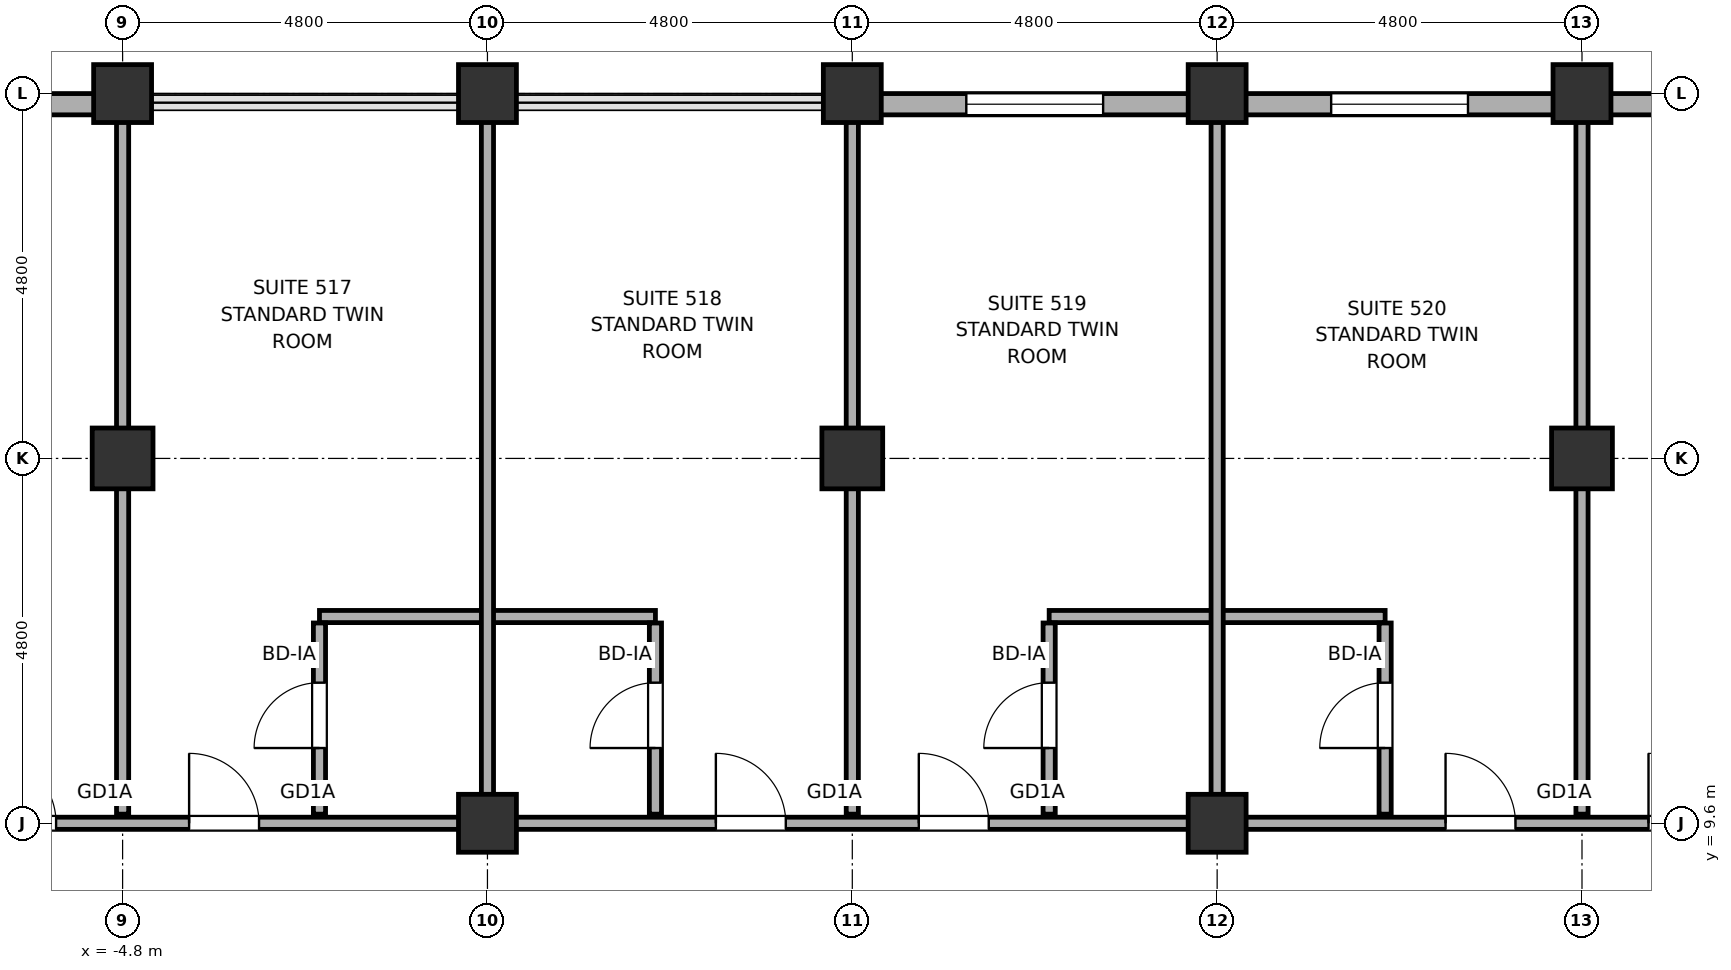
"""IFC4 building model, lengths in metres.
Left out: names, types, materials, properties, quantities, classifications, styles, units other than length and angle.
Written with IfcOpenShell. Run it as: python <this file> out.ifc"""

import sys

from ifc_helpers import new_model, si_unit, direction, frame, frame_2d, origin, origin_2d, place, context, subcontext, project, spatial, rectangle, hollow_rectangle, hollow_circle, extrude, element, fill, save


model = new_model("IFC4")
c1 = context("Model", 3, precision=1e-05, world=origin(), true_north=direction((0.0, 1.0)))
c2 = subcontext(c1, "Body", "Model", "MODEL_VIEW")
j1 = project(units=[si_unit("LENGTHUNIT", "METRE"), si_unit("PLANEANGLEUNIT", "RADIAN")], contexts=[c1])
p1 = place(None, origin())
s1 = spatial("IfcSite", under=j1, at=p1, CompositionType="ELEMENT")
p2 = place(p1, origin())
s2 = spatial("IfcBuilding", under=s1, at=p2, CompositionType="ELEMENT")
p3 = place(p2, frame((0.0, 0.0, 30.0)))
s3 = spatial("IfcBuildingStorey", under=s2, at=p3, CompositionType="ELEMENT", Elevation=30.0)
p4 = place(p3, frame((-4.8, 14.4, 0.0), z_axis=(0.0, 0.0, 1.0), x_axis=(1.0, 0.0, 0.0)))
e1 = element("IfcColumn", 1, at=p4, inside=s3, PredefinedType="COLUMN", context=c2, shape_type="SweptSolid", body=[
    extrude(hollow_rectangle(XDim=0.8, YDim=0.8, WallThickness=0.036, at=origin_2d()), origin(), (0.0, 0.0, 1.0), 3.7),
])
for number, where, z_axis, x_axis in (
    (2, (-4.8, 19.2, 0.0), (0.0, 0.0, 1.0), (1.0, 0.0, 0.0)),
    (3, (0.0, 9.6, 0.0), (0.0, 0.0, 1.0), (1.0, 0.0, 0.0)),
    (4, (0.0, 19.2, 0.0), (0.0, 0.0, 1.0), (1.0, 0.0, 0.0)),
):
    element("IfcColumn", number, at=place(p3, frame(where, z_axis=z_axis, x_axis=x_axis)), inside=s3, PredefinedType="COLUMN", context=c2, shape_type="SweptSolid", body=[
        extrude(hollow_circle(Radius=0.381, WallThickness=0.032, at=origin_2d()), origin(), (0.0, 0.0, 1.0), 3.7),
    ])
p5 = place(p3, frame((4.8, 14.4, 0.0), z_axis=(0.0, 0.0, 1.0), x_axis=(1.0, 0.0, 0.0)))
e5 = element("IfcColumn", 5, at=p5, inside=s3, PredefinedType="COLUMN", context=c2, shape_type="SweptSolid", body=[
    extrude(hollow_rectangle(XDim=0.8, YDim=0.8, WallThickness=0.036, at=origin_2d()), origin(), (0.0, 0.0, 1.0), 3.7),
])
for number, where, z_axis, x_axis in (
    (6, (4.8, 19.2, 0.0), (0.0, 0.0, 1.0), (1.0, 0.0, 0.0)),
    (7, (9.6, 9.6, 0.0), (0.0, 0.0, 1.0), (1.0, 0.0, 0.0)),
    (8, (9.6, 19.2, 0.0), (0.0, 0.0, 1.0), (1.0, 0.0, 0.0)),
):
    element("IfcColumn", number, at=place(p3, frame(where, z_axis=z_axis, x_axis=x_axis)), inside=s3, PredefinedType="COLUMN", context=c2, shape_type="SweptSolid", body=[
        extrude(hollow_circle(Radius=0.381, WallThickness=0.032, at=origin_2d()), origin(), (0.0, 0.0, 1.0), 3.7),
    ])
p6 = place(p3, frame((14.4, 14.4, 0.0), z_axis=(0.0, 0.0, 1.0), x_axis=(1.0, 0.0, 0.0)))
e9 = element("IfcColumn", 9, at=p6, inside=s3, PredefinedType="COLUMN", context=c2, shape_type="SweptSolid", body=[
    extrude(hollow_rectangle(XDim=0.8, YDim=0.8, WallThickness=0.036, at=origin_2d()), origin(), (0.0, 0.0, 1.0), 3.7),
])
p7 = place(p3, frame((14.4, 19.2, 0.0), z_axis=(0.0, 0.0, 1.0), x_axis=(1.0, 0.0, 0.0)))
e10 = element("IfcColumn", 10, at=p7, inside=s3, PredefinedType="COLUMN", context=c2, shape_type="SweptSolid", body=[
    extrude(hollow_circle(Radius=0.381, WallThickness=0.032, at=origin_2d()), origin(), (0.0, 0.0, 1.0), 3.7),
])
p8 = place(p3, frame((-30.0, 19.06, 0.0), z_axis=(0.0, 0.0, 1.0), x_axis=(1.0, 0.0, 0.0)))
e11 = element("IfcWall", 11, at=p8, inside=s3, PredefinedType="SOLIDWALL", context=c2, shape_type="SweptSolid", body=[
    extrude(rectangle(XDim=25.25, YDim=0.28, at=frame_2d((12.625, 0.0))), origin(), (0.0, 0.0, 1.0), 2.12),
])
p9 = place(p8, frame((17.1, 0.0, 0.0)))
e12 = element("IfcOpeningElement", 12, at=p9, cuts=e11, PredefinedType="OPENING", context=c2, shape_type="SweptSolid", body=[
    extrude(rectangle(XDim=1.8, YDim=2.02, at=frame_2d((0.9, 1.01))), frame((0.0, 0.155, 0.0), z_axis=(0.0, -1.0, 0.0), x_axis=(1.0, 0.0, 0.0)), (0.0, 0.0, 1.0), 0.31),
])
p10 = place(p8, frame((9.0, 0.0, 0.75)))
e13 = element("IfcOpeningElement", 13, at=p10, cuts=e11, PredefinedType="OPENING", context=c2, shape_type="SweptSolid", body=[
    extrude(rectangle(XDim=1.2, YDim=1.15, at=frame_2d((0.6, 0.575))), frame((0.0, 0.155, 0.0), z_axis=(0.0, -1.0, 0.0), x_axis=(1.0, 0.0, 0.0)), (0.0, 0.0, 1.0), 0.31),
])
p11 = place(p8, frame((12.3, 0.0, 0.75)))
e14 = element("IfcOpeningElement", 14, at=p11, cuts=e11, PredefinedType="OPENING", context=c2, shape_type="SweptSolid", body=[
    extrude(rectangle(XDim=1.8, YDim=1.15, at=frame_2d((0.9, 0.575))), frame((0.0, 0.155, 0.0), z_axis=(0.0, -1.0, 0.0), x_axis=(1.0, 0.0, 0.0)), (0.0, 0.0, 1.0), 0.31),
])
p12 = place(p8, frame((21.9, 0.0, 0.75)))
e15 = element("IfcOpeningElement", 15, at=p12, cuts=e11, PredefinedType="OPENING", context=c2, shape_type="SweptSolid", body=[
    extrude(rectangle(XDim=1.8, YDim=1.15, at=frame_2d((0.9, 0.575))), frame((0.0, 0.155, 0.0), z_axis=(0.0, -1.0, 0.0), x_axis=(1.0, 0.0, 0.0)), (0.0, 0.0, 1.0), 0.31),
])
p13 = place(p3, frame((4.75, 19.06, 0.0), z_axis=(0.0, 0.0, 1.0), x_axis=(1.0, 0.0, 0.0)))
e16 = element("IfcWall", 16, at=p13, inside=s3, PredefinedType="SOLIDWALL", context=c2, shape_type="SweptSolid", body=[
    extrude(rectangle(XDim=20.45, YDim=0.28, at=frame_2d((10.225, 0.0))), origin(), (0.0, 0.0, 1.0), 2.12),
])
p14 = place(p13, frame((1.55, 0.0, 0.75)))
e17 = element("IfcOpeningElement", 17, at=p14, cuts=e16, PredefinedType="OPENING", context=c2, shape_type="SweptSolid", body=[
    extrude(rectangle(XDim=1.8, YDim=1.15, at=frame_2d((0.9, 0.575))), frame((0.0, 0.155, 0.0), z_axis=(0.0, -1.0, 0.0), x_axis=(1.0, 0.0, 0.0)), (0.0, 0.0, 1.0), 0.31),
])
p15 = place(p13, frame((6.35, 0.0, 0.75)))
e18 = element("IfcOpeningElement", 18, at=p15, cuts=e16, PredefinedType="OPENING", context=c2, shape_type="SweptSolid", body=[
    extrude(rectangle(XDim=1.8, YDim=1.15, at=frame_2d((0.9, 0.575))), frame((0.0, 0.155, 0.0), z_axis=(0.0, -1.0, 0.0), x_axis=(1.0, 0.0, 0.0)), (0.0, 0.0, 1.0), 0.31),
])
p16 = place(p13, frame((11.15, 0.0, 0.75)))
e19 = element("IfcOpeningElement", 19, at=p16, cuts=e16, PredefinedType="OPENING", context=c2, shape_type="SweptSolid", body=[
    extrude(rectangle(XDim=1.8, YDim=1.15, at=frame_2d((0.9, 0.575))), frame((0.0, 0.155, 0.0), z_axis=(0.0, -1.0, 0.0), x_axis=(1.0, 0.0, 0.0)), (0.0, 0.0, 1.0), 0.31),
])
p17 = place(p3, frame((-33.43, 9.6, 0.0), z_axis=(0.0, 0.0, 1.0), x_axis=(1.0, 0.0, 0.0)))
e20 = element("IfcWall", 20, at=p17, inside=s3, PredefinedType="PARTITIONING", context=c2, shape_type="SweptSolid", body=[
    extrude(rectangle(XDim=62.06, YDim=0.16, at=frame_2d((31.03, 0.0))), origin(), (0.0, 0.0, 1.0), 2.12),
])
p18 = place(p17, frame((6.8, 0.0, 0.0)))
e21 = element("IfcOpeningElement", 21, at=p18, cuts=e20, PredefinedType="OPENING", context=c2, shape_type="SweptSolid", body=[
    extrude(rectangle(XDim=0.9, YDim=2.02, at=frame_2d((0.45, 1.01))), frame((0.0, 0.095, 0.0), z_axis=(0.0, -1.0, 0.0), x_axis=(1.0, 0.0, 0.0)), (0.0, 0.0, 1.0), 0.19),
])
p19 = place(p17, frame((54.361, 0.0, 0.0)))
e22 = element("IfcOpeningElement", 22, at=p19, cuts=e20, PredefinedType="OPENING", context=c2, shape_type="SweptSolid", body=[
    extrude(rectangle(XDim=0.9, YDim=2.02, at=frame_2d((0.45, 1.01))), frame((0.0, 0.095, 0.0), z_axis=(0.0, -1.0, 0.0), x_axis=(1.0, 0.0, 0.0)), (0.0, 0.0, 1.0), 0.19),
])
p20 = place(p17, frame((10.69, 0.0, 0.0)))
e23 = element("IfcOpeningElement", 23, at=p20, cuts=e20, PredefinedType="OPENING", context=c2, shape_type="SweptSolid", body=[
    extrude(rectangle(XDim=0.9, YDim=2.02, at=frame_2d((0.45, 1.01))), frame((0.0, 0.095, 0.0), z_axis=(0.0, -1.0, 0.0), x_axis=(1.0, 0.0, 0.0)), (0.0, 0.0, 1.0), 0.19),
])
p21 = place(p17, frame((12.07, 0.0, 0.0)))
e24 = element("IfcOpeningElement", 24, at=p21, cuts=e20, PredefinedType="OPENING", context=c2, shape_type="SweptSolid", body=[
    extrude(rectangle(XDim=0.9, YDim=2.02, at=frame_2d((0.45, 1.01))), frame((0.0, 0.095, 0.0), z_axis=(0.0, -1.0, 0.0), x_axis=(1.0, 0.0, 0.0)), (0.0, 0.0, 1.0), 0.19),
])
p22 = place(p17, frame((17.235, 0.0, 0.0)))
e25 = element("IfcOpeningElement", 25, at=p22, cuts=e20, PredefinedType="OPENING", context=c2, shape_type="SweptSolid", body=[
    extrude(rectangle(XDim=0.92, YDim=2.02, at=frame_2d((0.46, 1.01))), frame((0.0, 0.095, 0.0), z_axis=(0.0, -1.0, 0.0), x_axis=(1.0, 0.0, 0.0)), (0.0, 0.0, 1.0), 0.19),
])
p23 = place(p17, frame((19.905, 0.0, 0.0)))
e26 = element("IfcOpeningElement", 26, at=p23, cuts=e20, PredefinedType="OPENING", context=c2, shape_type="SweptSolid", body=[
    extrude(rectangle(XDim=0.92, YDim=2.02, at=frame_2d((0.46, 1.01))), frame((0.0, 0.095, 0.0), z_axis=(0.0, -1.0, 0.0), x_axis=(1.0, 0.0, 0.0)), (0.0, 0.0, 1.0), 0.19),
])
p24 = place(p17, frame((26.835, 0.0, 0.0)))
e27 = element("IfcOpeningElement", 27, at=p24, cuts=e20, PredefinedType="OPENING", context=c2, shape_type="SweptSolid", body=[
    extrude(rectangle(XDim=0.92, YDim=2.02, at=frame_2d((0.46, 1.01))), frame((0.0, 0.095, 0.0), z_axis=(0.0, -1.0, 0.0), x_axis=(1.0, 0.0, 0.0)), (0.0, 0.0, 1.0), 0.19),
])
p25 = place(p17, frame((29.505, 0.0, 0.0)))
e28 = element("IfcOpeningElement", 28, at=p25, cuts=e20, PredefinedType="OPENING", context=c2, shape_type="SweptSolid", body=[
    extrude(rectangle(XDim=0.92, YDim=2.02, at=frame_2d((0.46, 1.01))), frame((0.0, 0.095, 0.0), z_axis=(0.0, -1.0, 0.0), x_axis=(1.0, 0.0, 0.0)), (0.0, 0.0, 1.0), 0.19),
])
p26 = place(p17, frame((36.435, 0.0, 0.0)))
e29 = element("IfcOpeningElement", 29, at=p26, cuts=e20, PredefinedType="OPENING", context=c2, shape_type="SweptSolid", body=[
    extrude(rectangle(XDim=0.92, YDim=2.02, at=frame_2d((0.46, 1.01))), frame((0.0, 0.095, 0.0), z_axis=(0.0, -1.0, 0.0), x_axis=(1.0, 0.0, 0.0)), (0.0, 0.0, 1.0), 0.19),
])
p27 = place(p17, frame((39.105, 0.0, 0.0)))
e30 = element("IfcOpeningElement", 30, at=p27, cuts=e20, PredefinedType="OPENING", context=c2, shape_type="SweptSolid", body=[
    extrude(rectangle(XDim=0.92, YDim=2.02, at=frame_2d((0.46, 1.01))), frame((0.0, 0.095, 0.0), z_axis=(0.0, -1.0, 0.0), x_axis=(1.0, 0.0, 0.0)), (0.0, 0.0, 1.0), 0.19),
])
p28 = place(p17, frame((46.035, 0.0, 0.0)))
e31 = element("IfcOpeningElement", 31, at=p28, cuts=e20, PredefinedType="OPENING", context=c2, shape_type="SweptSolid", body=[
    extrude(rectangle(XDim=0.92, YDim=2.02, at=frame_2d((0.46, 1.01))), frame((0.0, 0.095, 0.0), z_axis=(0.0, -1.0, 0.0), x_axis=(1.0, 0.0, 0.0)), (0.0, 0.0, 1.0), 0.19),
])
p29 = place(p17, frame((48.705, 0.0, 0.0)))
e32 = element("IfcOpeningElement", 32, at=p29, cuts=e20, PredefinedType="OPENING", context=c2, shape_type="SweptSolid", body=[
    extrude(rectangle(XDim=0.92, YDim=2.02, at=frame_2d((0.46, 1.01))), frame((0.0, 0.095, 0.0), z_axis=(0.0, -1.0, 0.0), x_axis=(1.0, 0.0, 0.0)), (0.0, 0.0, 1.0), 0.19),
])
p30 = place(p3, frame((-2.21, 12.32, 0.0), z_axis=(0.0, 0.0, 1.0), x_axis=(1.0, 0.0, 0.0)))
e33 = element("IfcWall", 33, at=p30, inside=s3, PredefinedType="PARTITIONING", context=c2, shape_type="SweptSolid", body=[
    extrude(rectangle(XDim=4.42, YDim=0.16, at=frame_2d((2.21, 0.0))), origin(), (0.0, 0.0, 1.0), 3.02),
])
p31 = place(p3, frame((7.39, 12.32, 0.0), z_axis=(0.0, 0.0, 1.0), x_axis=(1.0, 0.0, 0.0)))
e34 = element("IfcWall", 34, at=p31, inside=s3, PredefinedType="PARTITIONING", context=c2, shape_type="SweptSolid", body=[
    extrude(rectangle(XDim=4.42, YDim=0.16, at=frame_2d((2.21, 0.0))), origin(), (0.0, 0.0, 1.0), 3.02),
])
p32 = place(p3, frame((-4.8, 9.72, 0.0), z_axis=(0.0, 0.0, 1.0), x_axis=(0.0, 1.0, 0.0)))
e35 = element("IfcWall", 35, at=p32, inside=s3, PredefinedType="PARTITIONING", context=c2, shape_type="SweptSolid", body=[
    extrude(rectangle(XDim=9.19, YDim=0.16, at=frame_2d((4.595, 0.0))), origin(), (0.0, 0.0, 1.0), 2.12),
])
p33 = place(p3, frame((-2.21, 9.72, 0.0), z_axis=(0.0, 0.0, 1.0), x_axis=(0.0, 1.0, 0.0)))
e36 = element("IfcWall", 36, at=p33, inside=s3, PredefinedType="PARTITIONING", context=c2, shape_type="SweptSolid", body=[
    extrude(rectangle(XDim=2.515, YDim=0.16, at=frame_2d((1.258, 0.0))), origin(), (0.0, 0.0, 1.0), 2.12),
])
p34 = place(p33, frame((0.87, 0.0, 0.0)))
e37 = element("IfcOpeningElement", 37, at=p34, cuts=e36, PredefinedType="OPENING", context=c2, shape_type="SweptSolid", body=[
    extrude(rectangle(XDim=0.86, YDim=2.02, at=frame_2d((0.43, 1.01))), frame((0.0, 0.095, 0.0), z_axis=(0.0, -1.0, 0.0), x_axis=(1.0, 0.0, 0.0)), (0.0, 0.0, 1.0), 0.19),
])
p35 = place(p3, frame((0.0, 9.72, 0.0), z_axis=(0.0, 0.0, 1.0), x_axis=(0.0, 1.0, 0.0)))
e38 = element("IfcWall", 38, at=p35, inside=s3, PredefinedType="PARTITIONING", context=c2, shape_type="SweptSolid", body=[
    extrude(rectangle(XDim=9.275, YDim=0.16, at=frame_2d((4.638, 0.0))), origin(), (0.0, 0.0, 1.0), 2.12),
])
p36 = place(p3, frame((2.21, 9.72, 0.0), z_axis=(0.0, 0.0, 1.0), x_axis=(0.0, 1.0, 0.0)))
e39 = element("IfcWall", 39, at=p36, inside=s3, PredefinedType="PARTITIONING", context=c2, shape_type="SweptSolid", body=[
    extrude(rectangle(XDim=2.515, YDim=0.16, at=frame_2d((1.258, 0.0))), origin(), (0.0, 0.0, 1.0), 2.12),
])
p37 = place(p36, frame((0.87, 0.0, 0.0)))
e40 = element("IfcOpeningElement", 40, at=p37, cuts=e39, PredefinedType="OPENING", context=c2, shape_type="SweptSolid", body=[
    extrude(rectangle(XDim=0.86, YDim=2.02, at=frame_2d((0.43, 1.01))), frame((0.0, 0.095, 0.0), z_axis=(0.0, -1.0, 0.0), x_axis=(1.0, 0.0, 0.0)), (0.0, 0.0, 1.0), 0.19),
])
p38 = place(p3, frame((4.8, 9.72, 0.0), z_axis=(0.0, 0.0, 1.0), x_axis=(0.0, 1.0, 0.0)))
e41 = element("IfcWall", 41, at=p38, inside=s3, PredefinedType="PARTITIONING", context=c2, shape_type="SweptSolid", body=[
    extrude(rectangle(XDim=9.19, YDim=0.16, at=frame_2d((4.595, 0.0))), origin(), (0.0, 0.0, 1.0), 2.12),
])
p39 = place(p3, frame((7.39, 9.72, 0.0), z_axis=(0.0, 0.0, 1.0), x_axis=(0.0, 1.0, 0.0)))
e42 = element("IfcWall", 42, at=p39, inside=s3, PredefinedType="PARTITIONING", context=c2, shape_type="SweptSolid", body=[
    extrude(rectangle(XDim=2.515, YDim=0.16, at=frame_2d((1.258, 0.0))), origin(), (0.0, 0.0, 1.0), 2.12),
])
p40 = place(p39, frame((0.87, 0.0, 0.0)))
e43 = element("IfcOpeningElement", 43, at=p40, cuts=e42, PredefinedType="OPENING", context=c2, shape_type="SweptSolid", body=[
    extrude(rectangle(XDim=0.86, YDim=2.02, at=frame_2d((0.43, 1.01))), frame((0.0, 0.095, 0.0), z_axis=(0.0, -1.0, 0.0), x_axis=(1.0, 0.0, 0.0)), (0.0, 0.0, 1.0), 0.19),
])
p41 = place(p3, frame((9.6, 9.72, 0.0), z_axis=(0.0, 0.0, 1.0), x_axis=(0.0, 1.0, 0.0)))
e44 = element("IfcWall", 44, at=p41, inside=s3, PredefinedType="PARTITIONING", context=c2, shape_type="SweptSolid", body=[
    extrude(rectangle(XDim=9.19, YDim=0.16, at=frame_2d((4.595, 0.0))), origin(), (0.0, 0.0, 1.0), 2.12),
])
p42 = place(p3, frame((11.81, 9.72, 0.0), z_axis=(0.0, 0.0, 1.0), x_axis=(0.0, 1.0, 0.0)))
e45 = element("IfcWall", 45, at=p42, inside=s3, PredefinedType="PARTITIONING", context=c2, shape_type="SweptSolid", body=[
    extrude(rectangle(XDim=2.515, YDim=0.16, at=frame_2d((1.258, 0.0))), origin(), (0.0, 0.0, 1.0), 2.12),
])
p43 = place(p42, frame((0.87, 0.0, 0.0)))
e46 = element("IfcOpeningElement", 46, at=p43, cuts=e45, PredefinedType="OPENING", context=c2, shape_type="SweptSolid", body=[
    extrude(rectangle(XDim=0.86, YDim=2.02, at=frame_2d((0.43, 1.01))), frame((0.0, 0.095, 0.0), z_axis=(0.0, -1.0, 0.0), x_axis=(1.0, 0.0, 0.0)), (0.0, 0.0, 1.0), 0.19),
])
p44 = place(p3, frame((14.4, 9.72, 0.0), z_axis=(0.0, 0.0, 1.0), x_axis=(0.0, 1.0, 0.0)))
e47 = element("IfcWall", 47, at=p44, inside=s3, PredefinedType="PARTITIONING", context=c2, shape_type="SweptSolid", body=[
    extrude(rectangle(XDim=9.19, YDim=0.16, at=frame_2d((4.595, 0.0))), origin(), (0.0, 0.0, 1.0), 2.12),
])
p45 = place(p14, origin())
e48 = element("IfcWindow", 48, at=p45, inside=s3, PartitioningType="SINGLE_PANEL", PredefinedType="WINDOW", context=c2, shape_type="SweptSolid", body=[
    extrude(rectangle(XDim=1.8, YDim=1.15, at=frame_2d((0.9, 0.575))), frame((0.0, 0.03, 0.0), z_axis=(0.0, -1.0, 0.0), x_axis=(1.0, 0.0, 0.0)), (0.0, 0.0, 1.0), 0.06),
])
fill(e17, e48)
p46 = place(p15, origin())
e49 = element("IfcWindow", 49, at=p46, inside=s3, PartitioningType="SINGLE_PANEL", PredefinedType="WINDOW", context=c2, shape_type="SweptSolid", body=[
    extrude(rectangle(XDim=1.8, YDim=1.15, at=frame_2d((0.9, 0.575))), frame((0.0, 0.03, 0.0), z_axis=(0.0, -1.0, 0.0), x_axis=(1.0, 0.0, 0.0)), (0.0, 0.0, 1.0), 0.06),
])
fill(e18, e49)
p47 = place(p24, origin())
e50 = element("IfcDoor", 50, at=p47, inside=s3, OperationType="SINGLE_SWING_LEFT", PredefinedType="DOOR", context=c2, shape_type="SweptSolid", body=[
    extrude(rectangle(XDim=0.92, YDim=2.02, at=frame_2d((0.46, 1.01))), frame((0.0, 0.025, 0.0), z_axis=(0.0, -1.0, 0.0), x_axis=(1.0, 0.0, 0.0)), (0.0, 0.0, 1.0), 0.05),
])
fill(e27, e50)
p48 = place(p25, origin())
e51 = element("IfcDoor", 51, at=p48, inside=s3, OperationType="SINGLE_SWING_RIGHT", PredefinedType="DOOR", context=c2, shape_type="SweptSolid", body=[
    extrude(rectangle(XDim=0.92, YDim=2.02, at=frame_2d((0.46, 1.01))), frame((0.0, 0.025, 0.0), z_axis=(0.0, -1.0, 0.0), x_axis=(1.0, 0.0, 0.0)), (0.0, 0.0, 1.0), 0.05),
])
fill(e28, e51)
p49 = place(p34, origin())
e52 = element("IfcDoor", 52, at=p49, inside=s3, OperationType="SINGLE_SWING_LEFT", PredefinedType="DOOR", context=c2, shape_type="SweptSolid", body=[
    extrude(rectangle(XDim=0.86, YDim=2.02, at=frame_2d((0.43, 1.01))), frame((0.0, 0.025, 0.0), z_axis=(0.0, -1.0, 0.0), x_axis=(1.0, 0.0, 0.0)), (0.0, 0.0, 1.0), 0.05),
])
fill(e37, e52)
p50 = place(p26, origin())
e53 = element("IfcDoor", 53, at=p50, inside=s3, OperationType="SINGLE_SWING_LEFT", PredefinedType="DOOR", context=c2, shape_type="SweptSolid", body=[
    extrude(rectangle(XDim=0.92, YDim=2.02, at=frame_2d((0.46, 1.01))), frame((0.0, 0.025, 0.0), z_axis=(0.0, -1.0, 0.0), x_axis=(1.0, 0.0, 0.0)), (0.0, 0.0, 1.0), 0.05),
])
fill(e29, e53)
p51 = place(p37, origin())
e54 = element("IfcDoor", 54, at=p51, inside=s3, OperationType="SINGLE_SWING_RIGHT", PredefinedType="DOOR", context=c2, shape_type="SweptSolid", body=[
    extrude(rectangle(XDim=0.86, YDim=2.02, at=frame_2d((0.43, 1.01))), frame((0.0, 0.025, 0.0), z_axis=(0.0, -1.0, 0.0), x_axis=(1.0, 0.0, 0.0)), (0.0, 0.0, 1.0), 0.05),
])
fill(e40, e54)
p52 = place(p27, origin())
e55 = element("IfcDoor", 55, at=p52, inside=s3, OperationType="SINGLE_SWING_RIGHT", PredefinedType="DOOR", context=c2, shape_type="SweptSolid", body=[
    extrude(rectangle(XDim=0.92, YDim=2.02, at=frame_2d((0.46, 1.01))), frame((0.0, 0.025, 0.0), z_axis=(0.0, -1.0, 0.0), x_axis=(1.0, 0.0, 0.0)), (0.0, 0.0, 1.0), 0.05),
])
fill(e30, e55)
p53 = place(p40, origin())
e56 = element("IfcDoor", 56, at=p53, inside=s3, OperationType="SINGLE_SWING_RIGHT", PredefinedType="DOOR", context=c2, shape_type="SweptSolid", body=[
    extrude(rectangle(XDim=0.86, YDim=2.02, at=frame_2d((0.43, 1.01))), frame((0.0, 0.025, 0.0), z_axis=(0.0, -1.0, 0.0), x_axis=(1.0, 0.0, 0.0)), (0.0, 0.0, 1.0), 0.05),
])
fill(e43, e56)
p54 = place(p28, origin())
e57 = element("IfcDoor", 57, at=p54, inside=s3, OperationType="SINGLE_SWING_RIGHT", PredefinedType="DOOR", context=c2, shape_type="SweptSolid", body=[
    extrude(rectangle(XDim=0.92, YDim=2.02, at=frame_2d((0.46, 1.01))), frame((0.0, 0.025, 0.0), z_axis=(0.0, -1.0, 0.0), x_axis=(1.0, 0.0, 0.0)), (0.0, 0.0, 1.0), 0.05),
])
fill(e31, e57)
p55 = place(p43, origin())
e58 = element("IfcDoor", 58, at=p55, inside=s3, OperationType="SINGLE_SWING_RIGHT", PredefinedType="DOOR", context=c2, shape_type="SweptSolid", body=[
    extrude(rectangle(XDim=0.86, YDim=2.02, at=frame_2d((0.43, 1.01))), frame((0.0, 0.025, 0.0), z_axis=(0.0, -1.0, 0.0), x_axis=(1.0, 0.0, 0.0)), (0.0, 0.0, 1.0), 0.05),
])
fill(e46, e58)
p56 = place(p29, origin())
e59 = element("IfcDoor", 59, at=p56, inside=s3, OperationType="SINGLE_SWING_LEFT", PredefinedType="DOOR", context=c2, shape_type="SweptSolid", body=[
    extrude(rectangle(XDim=0.92, YDim=2.02, at=frame_2d((0.46, 1.01))), frame((0.0, 0.025, 0.0), z_axis=(0.0, -1.0, 0.0), x_axis=(1.0, 0.0, 0.0)), (0.0, 0.0, 1.0), 0.05),
])
fill(e32, e59)
save(model, sys.argv[1])
